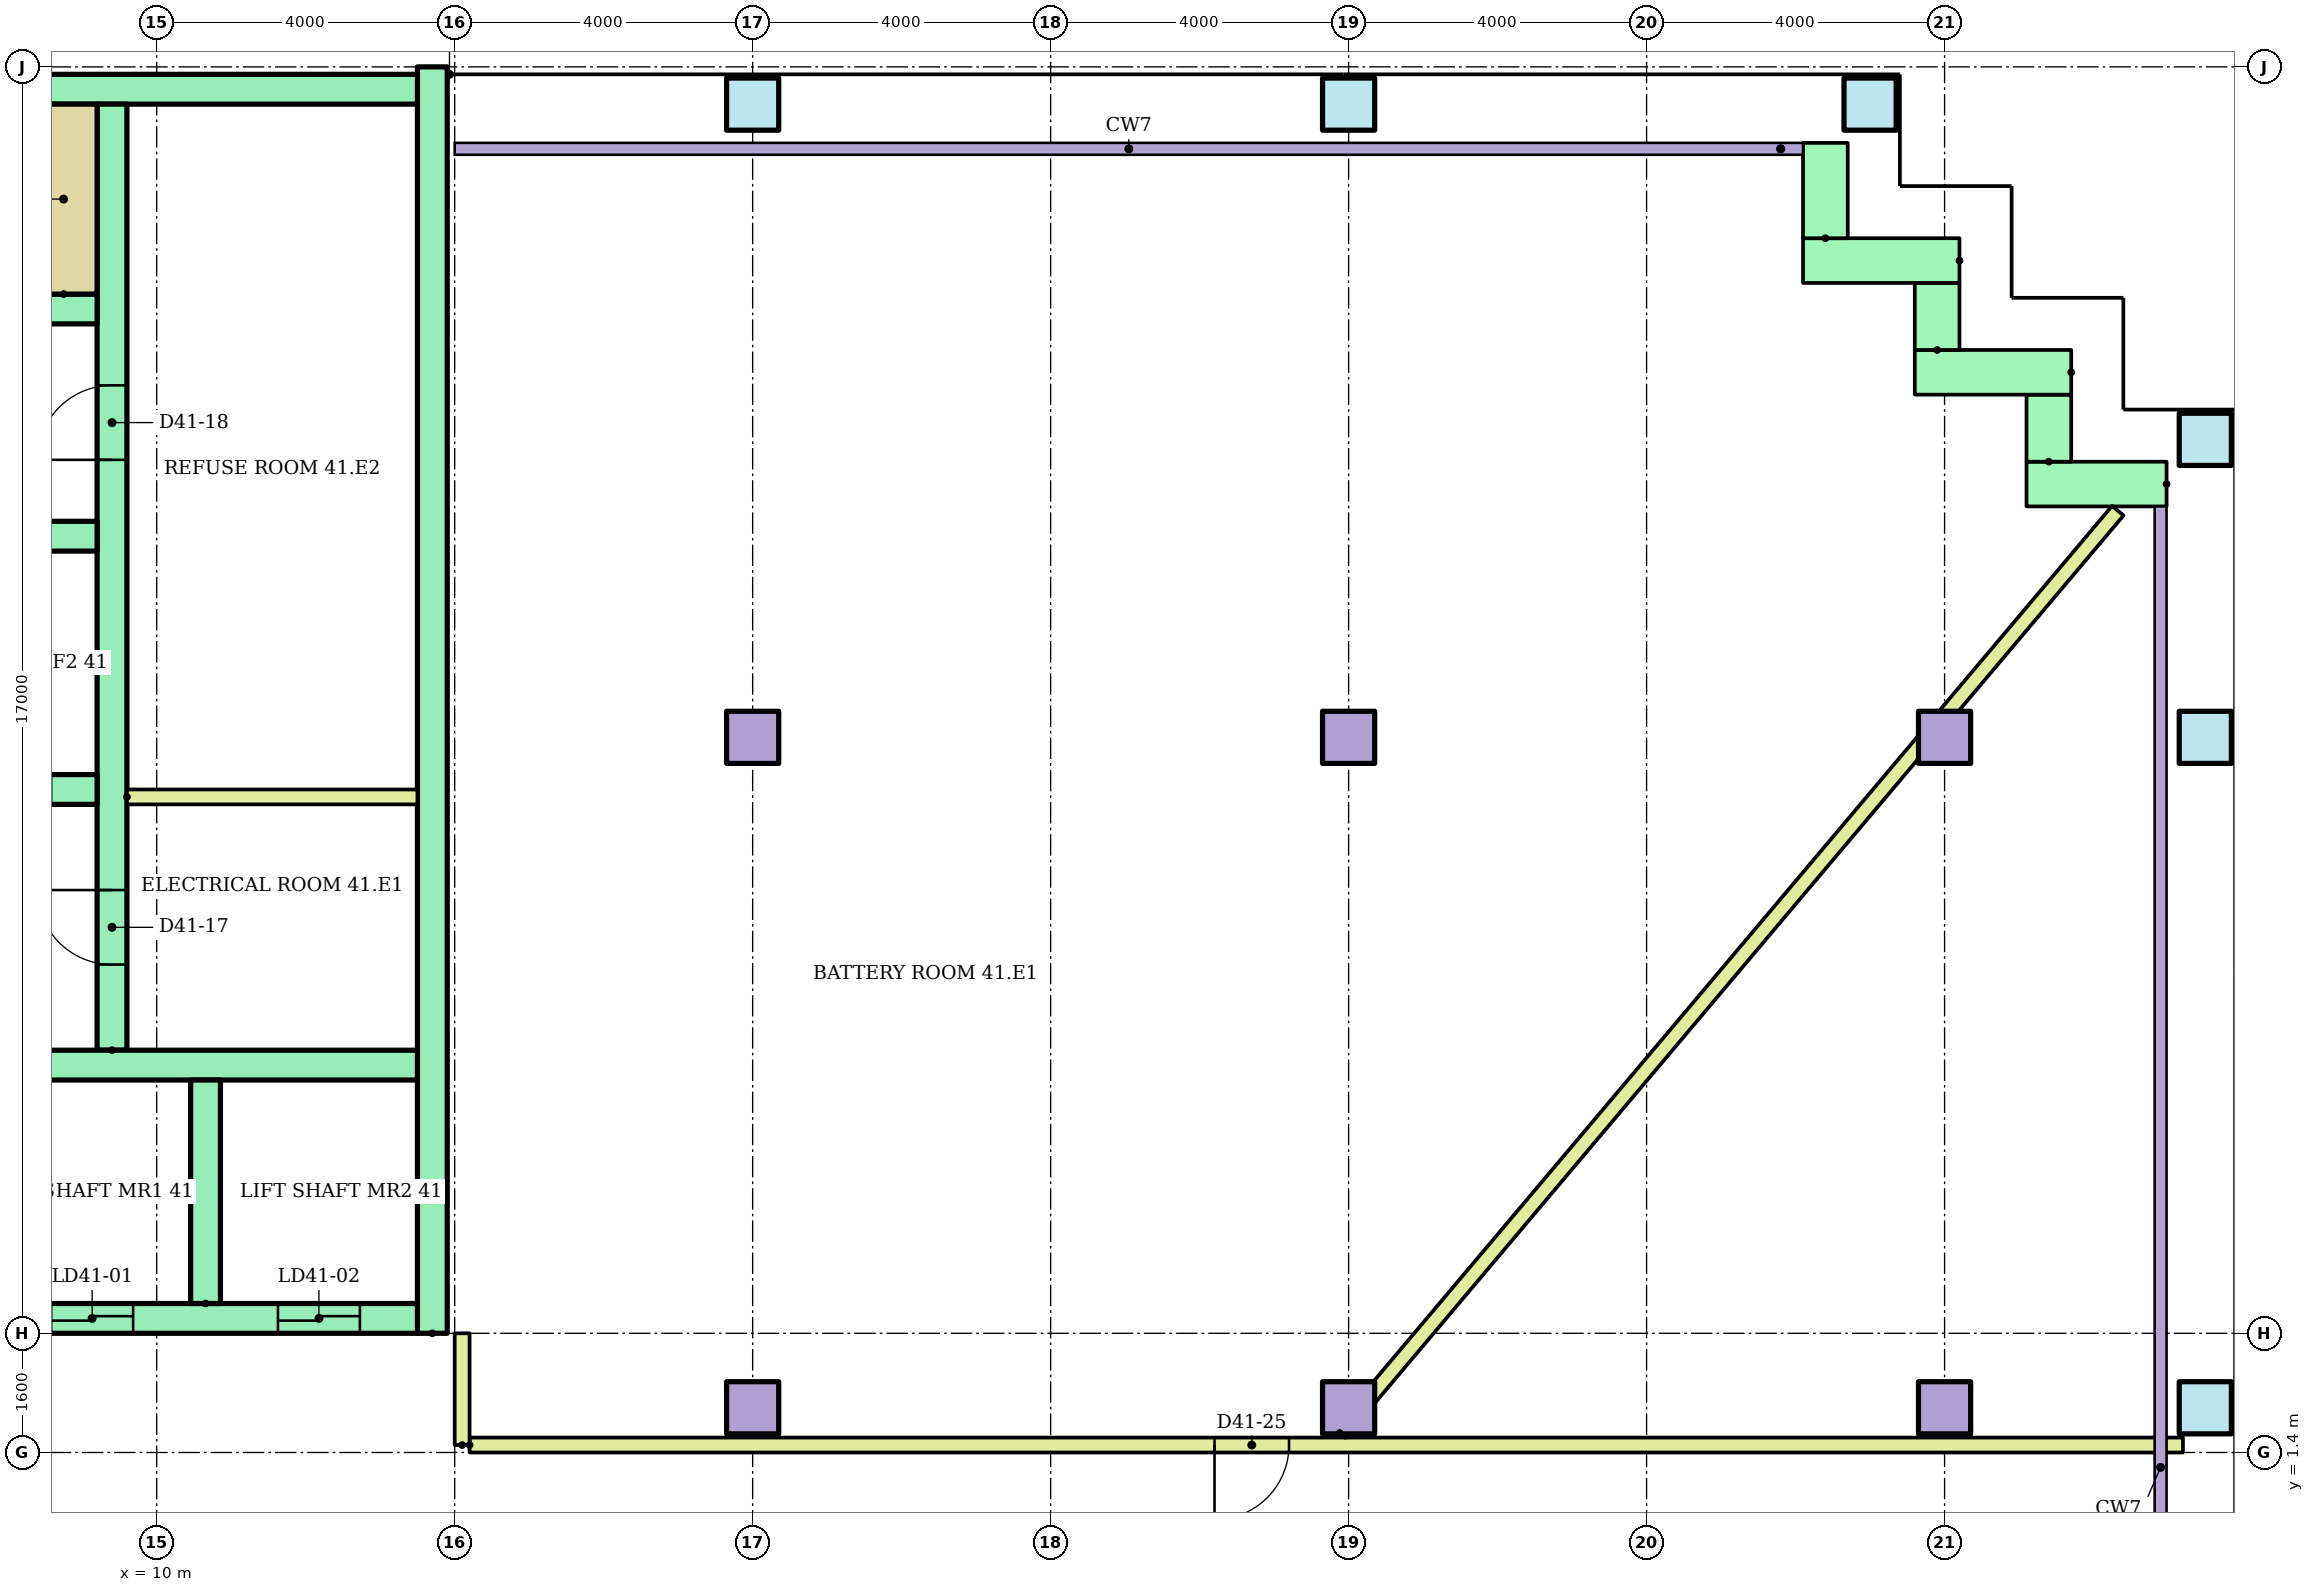
"""IFC4 building model, lengths in metres.
Left out: names, types, materials, properties, quantities, classifications, styles, units other than length and angle.
Written with IfcOpenShell. Run it as: python <this file> out.ifc"""

import sys

from ifc_helpers import new_model, si_unit, direction, frame, frame_2d, origin, origin_2d, place, context, subcontext, project, spatial, rectangle, hollow_rectangle, extrude, element, fill, save


model = new_model("IFC4")
c1 = context("Model", 3, precision=1e-05, world=origin(), true_north=direction((0.0, 1.0)))
c2 = subcontext(c1, "Body", "Model", "MODEL_VIEW")
j1 = project(units=[si_unit("LENGTHUNIT", "METRE"), si_unit("PLANEANGLEUNIT", "RADIAN")], contexts=[c1])
p1 = place(None, origin())
s1 = spatial("IfcSite", under=j1, at=p1, CompositionType="ELEMENT")
p2 = place(p1, origin())
s2 = spatial("IfcBuilding", under=s1, at=p2, CompositionType="ELEMENT")
p3 = place(p2, frame((0.0, 0.0, 161.4)))
s3 = spatial("IfcBuildingStorey", under=s2, at=p3, CompositionType="ELEMENT", Elevation=161.4)
for number, where in (
    (1, (18.0, 2.0, 0.0)),
    (2, (26.0, 2.0, 0.0)),
    (3, (34.0, 2.0, 0.0)),
):
    element("IfcColumn", number, at=place(p3, frame(where)), inside=s3, PredefinedType="COLUMN", context=c2, shape_type="SweptSolid", body=[
        extrude(rectangle(XDim=0.7, YDim=0.7, at=origin_2d()), origin(), (0.0, 0.0, 1.0), 3.9),
    ])
p4 = place(p3, frame((37.5, 2.0, 0.0)))
e4 = element("IfcColumn", 4, at=p4, inside=s3, PredefinedType="COLUMN", context=c2, shape_type="SweptSolid", body=[
    extrude(hollow_rectangle(XDim=0.7, YDim=0.7, WallThickness=0.036, at=origin_2d()), origin(), (0.0, 0.0, 1.0), 3.9),
])
for number, where in (
    (5, (18.0, 11.0, 0.0)),
    (6, (26.0, 11.0, 0.0)),
    (7, (34.0, 11.0, 0.0)),
):
    element("IfcColumn", number, at=place(p3, frame(where)), inside=s3, PredefinedType="COLUMN", context=c2, shape_type="SweptSolid", body=[
        extrude(rectangle(XDim=0.7, YDim=0.7, at=origin_2d()), origin(), (0.0, 0.0, 1.0), 3.9),
    ])
for number, where in (
    (8, (37.5, 11.0, 0.0)),
    (9, (37.5, 15.0, 0.0)),
    (10, (18.0, 19.5, 0.0)),
    (11, (26.0, 19.5, 0.0)),
    (12, (33.0, 19.5, 0.0)),
):
    element("IfcColumn", number, at=place(p3, frame(where)), inside=s3, PredefinedType="COLUMN", context=c2, shape_type="SweptSolid", body=[
        extrude(hollow_rectangle(XDim=0.7, YDim=0.7, WallThickness=0.036, at=origin_2d()), origin(), (0.0, 0.0, 1.0), 3.9),
    ])
p5 = place(p3, frame((36.98, 14.4, 0.0), z_axis=(0.0, 0.0, 1.0), x_axis=(-1.0, 0.0, 0.0)))
e13 = element("IfcWall", 13, at=p5, inside=s3, PredefinedType="STANDARD", context=c2, shape_type="SweptSolid", body=[
    extrude(rectangle(XDim=1.88, YDim=0.6, at=frame_2d((0.94, 0.0))), origin(), (0.0, 0.0, 1.0), 3.62),
])
p6 = place(p3, frame((35.4, 14.7, 0.0), z_axis=(0.0, 0.0, 1.0), x_axis=(0.0, 1.0, 0.0)))
e14 = element("IfcWall", 14, at=p6, inside=s3, PredefinedType="STANDARD", context=c2, shape_type="SweptSolid", body=[
    extrude(rectangle(XDim=0.9, YDim=0.6, at=frame_2d((0.45, 0.0))), origin(), (0.0, 0.0, 1.0), 3.62),
])
p7 = place(p3, frame((35.7, 15.9, 0.0), z_axis=(0.0, 0.0, 1.0), x_axis=(-1.0, 0.0, 0.0)))
e15 = element("IfcWall", 15, at=p7, inside=s3, PredefinedType="STANDARD", context=c2, shape_type="SweptSolid", body=[
    extrude(rectangle(XDim=2.1, YDim=0.6, at=frame_2d((1.05, 0.0))), origin(), (0.0, 0.0, 1.0), 3.62),
])
p8 = place(p3, frame((33.9, 16.2, 0.0), z_axis=(0.0, 0.0, 1.0), x_axis=(0.0, 1.0, 0.0)))
e16 = element("IfcWall", 16, at=p8, inside=s3, PredefinedType="STANDARD", context=c2, shape_type="SweptSolid", body=[
    extrude(rectangle(XDim=0.9, YDim=0.6, at=frame_2d((0.45, 0.0))), origin(), (0.0, 0.0, 1.0), 3.62),
])
p9 = place(p3, frame((34.2, 17.4, 0.0), z_axis=(0.0, 0.0, 1.0), x_axis=(-1.0, 0.0, 0.0)))
e17 = element("IfcWall", 17, at=p9, inside=s3, PredefinedType="STANDARD", context=c2, shape_type="SweptSolid", body=[
    extrude(rectangle(XDim=2.1, YDim=0.6, at=frame_2d((1.05, 0.0))), origin(), (0.0, 0.0, 1.0), 3.62),
])
p10 = place(p3, frame((32.4, 17.7, 0.0), z_axis=(0.0, 0.0, 1.0), x_axis=(0.0, 1.0, 0.0)))
e18 = element("IfcWall", 18, at=p10, inside=s3, PredefinedType="STANDARD", context=c2, shape_type="SweptSolid", body=[
    extrude(rectangle(XDim=1.28, YDim=0.6, at=frame_2d((0.64, 0.0))), origin(), (0.0, 0.0, 1.0), 3.62),
])
p11 = place(p3, frame((13.7, 3.0, 0.0), z_axis=(0.0, 0.0, 1.0), x_axis=(0.0, 1.0, 0.0)))
e19 = element("IfcWall", 19, at=p11, inside=s3, PredefinedType="SHEAR", context=c2, shape_type="SweptSolid", body=[
    extrude(rectangle(XDim=17.0, YDim=0.4, at=frame_2d((8.5, 0.0))), origin(), (0.0, 0.0, 1.0), 3.62),
])
p12 = place(p3, frame((-13.5, 19.7, 0.0)))
e20 = element("IfcWall", 20, at=p12, inside=s3, PredefinedType="SHEAR", context=c2, shape_type="SweptSolid", body=[
    extrude(rectangle(XDim=27.0, YDim=0.4, at=frame_2d((13.5, 0.0))), origin(), (0.0, 0.0, 1.0), 3.62),
])
p13 = place(p3, frame((9.4, 6.8, 0.0), z_axis=(0.0, 0.0, 1.0), x_axis=(0.0, 1.0, 0.0)))
e21 = element("IfcWall", 21, at=p13, inside=s3, PredefinedType="SHEAR", context=c2, shape_type="SweptSolid", body=[
    extrude(rectangle(XDim=12.7, YDim=0.4, at=frame_2d((6.35, 0.0))), origin(), (0.0, 0.0, 1.0), 3.62),
])
p14 = place(p13, frame((1.15, 0.0, 0.0)))
e22 = element("IfcOpeningElement", 22, at=p14, cuts=e21, PredefinedType="OPENING", context=c2, shape_type="SweptSolid", body=[
    extrude(rectangle(XDim=1.0, YDim=2.1, at=frame_2d((0.5, 1.05))), frame((0.0, 0.21, 0.0), z_axis=(0.0, -1.0, 0.0), x_axis=(1.0, 0.0, 0.0)), (0.0, 0.0, 1.0), 0.42),
])
p15 = place(p13, frame((7.925, 0.0, 0.0)))
e23 = element("IfcOpeningElement", 23, at=p15, cuts=e21, PredefinedType="OPENING", context=c2, shape_type="SweptSolid", body=[
    extrude(rectangle(XDim=1.0, YDim=2.1, at=frame_2d((0.5, 1.05))), frame((0.0, 0.21, 0.0), z_axis=(0.0, -1.0, 0.0), x_axis=(1.0, 0.0, 0.0)), (0.0, 0.0, 1.0), 0.42),
])
p16 = place(p3, frame((-13.5, 3.2, 0.0)))
e24 = element("IfcWall", 24, at=p16, inside=s3, PredefinedType="SHEAR", context=c2, shape_type="SweptSolid", body=[
    extrude(rectangle(XDim=27.0, YDim=0.4, at=frame_2d((13.5, 0.0))), origin(), (0.0, 0.0, 1.0), 3.62),
])
p17 = place(p16, frame((22.083, 0.0, 0.0)))
e25 = element("IfcOpeningElement", 25, at=p17, cuts=e24, PredefinedType="OPENING", context=c2, shape_type="SweptSolid", body=[
    extrude(rectangle(XDim=1.1, YDim=2.1, at=frame_2d((0.55, 1.05))), frame((0.0, 0.21, 0.0), z_axis=(0.0, -1.0, 0.0), x_axis=(1.0, 0.0, 0.0)), (0.0, 0.0, 1.0), 0.42),
])
p18 = place(p16, frame((25.128, 0.0, 0.0)))
e26 = element("IfcOpeningElement", 26, at=p18, cuts=e24, PredefinedType="OPENING", context=c2, shape_type="SweptSolid", body=[
    extrude(rectangle(XDim=1.1, YDim=2.1, at=frame_2d((0.55, 1.05))), frame((0.0, 0.21, 0.0), z_axis=(0.0, -1.0, 0.0), x_axis=(1.0, 0.0, 0.0)), (0.0, 0.0, 1.0), 0.42),
])
p19 = place(p16, frame((12.6, 0.0, 0.0)))
e27 = element("IfcOpeningElement", 27, at=p19, cuts=e24, PredefinedType="OPENING", context=c2, shape_type="SweptSolid", body=[
    extrude(rectangle(XDim=1.8, YDim=2.1, at=frame_2d((0.9, 1.05))), frame((0.0, 0.21, 0.0), z_axis=(0.0, -1.0, 0.0), x_axis=(1.0, 0.0, 0.0)), (0.0, 0.0, 1.0), 0.42),
])
p20 = place(p3, frame((1.522, 6.6, 0.0)))
e28 = element("IfcWall", 28, at=p20, inside=s3, PredefinedType="SHEAR", context=c2, shape_type="SweptSolid", body=[
    extrude(rectangle(XDim=11.978, YDim=0.4, at=frame_2d((5.989, 0.0))), origin(), (0.0, 0.0, 1.0), 3.62),
])
p21 = place(p20, frame((1.022, 0.0, 0.0)))
e29 = element("IfcOpeningElement", 29, at=p21, cuts=e28, PredefinedType="OPENING", context=c2, shape_type="SweptSolid", body=[
    extrude(rectangle(XDim=1.0, YDim=2.1, at=frame_2d((0.5, 1.05))), frame((0.0, 0.21, 0.0), z_axis=(0.0, -1.0, 0.0), x_axis=(1.0, 0.0, 0.0)), (0.0, 0.0, 1.0), 0.42),
])
p22 = place(p20, frame((4.067, 0.0, 0.0)))
e30 = element("IfcOpeningElement", 30, at=p22, cuts=e28, PredefinedType="OPENING", context=c2, shape_type="SweptSolid", body=[
    extrude(rectangle(XDim=1.0, YDim=2.1, at=frame_2d((0.5, 1.05))), frame((0.0, 0.21, 0.0), z_axis=(0.0, -1.0, 0.0), x_axis=(1.0, 0.0, 0.0)), (0.0, 0.0, 1.0), 0.42),
])
p23 = place(p3, frame((10.656, 3.4, 0.0), z_axis=(0.0, 0.0, 1.0), x_axis=(0.0, 1.0, 0.0)))
e31 = element("IfcWall", 31, at=p23, inside=s3, PredefinedType="SHEAR", context=c2, shape_type="SweptSolid", body=[
    extrude(rectangle(XDim=3.0, YDim=0.4, at=frame_2d((1.5, 0.0))), origin(), (0.0, 0.0, 1.0), 3.62),
])
p24 = place(p3, frame((1.2, 10.3, 0.0)))
e32 = element("IfcWall", 32, at=p24, inside=s3, PredefinedType="SHEAR", context=c2, shape_type="SweptSolid", body=[
    extrude(rectangle(XDim=8.0, YDim=0.4, at=frame_2d((4.0, 0.0))), origin(), (0.0, 0.0, 1.0), 3.62),
])
p25 = place(p24, frame((3.55, 0.0, 0.0)))
e33 = element("IfcOpeningElement", 33, at=p25, cuts=e32, PredefinedType="OPENING", context=c2, shape_type="SweptSolid", body=[
    extrude(rectangle(XDim=1.1, YDim=2.1, at=frame_2d((0.55, 1.05))), frame((0.0, 0.21, 0.0), z_axis=(0.0, -1.0, 0.0), x_axis=(1.0, 0.0, 0.0)), (0.0, 0.0, 1.0), 0.42),
])
p26 = place(p24, frame((6.283, 0.0, 0.0)))
e34 = element("IfcOpeningElement", 34, at=p26, cuts=e32, PredefinedType="OPENING", context=c2, shape_type="SweptSolid", body=[
    extrude(rectangle(XDim=1.1, YDim=2.1, at=frame_2d((0.55, 1.05))), frame((0.0, 0.21, 0.0), z_axis=(0.0, -1.0, 0.0), x_axis=(1.0, 0.0, 0.0)), (0.0, 0.0, 1.0), 0.42),
])
p27 = place(p24, frame((0.867, 0.0, 0.0)))
e35 = element("IfcOpeningElement", 35, at=p27, cuts=e32, PredefinedType="OPENING", context=c2, shape_type="SweptSolid", body=[
    extrude(rectangle(XDim=1.0, YDim=2.1, at=frame_2d((0.5, 1.05))), frame((0.0, 0.21, 0.0), z_axis=(0.0, -1.0, 0.0), x_axis=(1.0, 0.0, 0.0)), (0.0, 0.0, 1.0), 0.42),
])
p28 = place(p3, frame((1.2, 13.7, 0.0)))
e36 = element("IfcWall", 36, at=p28, inside=s3, PredefinedType="SHEAR", context=c2, shape_type="SweptSolid", body=[
    extrude(rectangle(XDim=8.0, YDim=0.4, at=frame_2d((4.0, 0.0))), origin(), (0.0, 0.0, 1.0), 3.62),
])
p29 = place(p3, frame((-9.2, 16.75, 0.0)))
e37 = element("IfcWall", 37, at=p29, inside=s3, PredefinedType="SHEAR", context=c2, shape_type="SweptSolid", body=[
    extrude(rectangle(XDim=18.4, YDim=0.4, at=frame_2d((9.2, 0.0))), origin(), (0.0, 0.0, 1.0), 3.62),
])
p30 = place(p29, frame((0.1, 0.0, 0.0)))
e38 = element("IfcOpeningElement", 38, at=p30, cuts=e37, PredefinedType="OPENING", context=c2, shape_type="SweptSolid", body=[
    extrude(rectangle(XDim=0.95, YDim=2.1, at=frame_2d((0.475, 1.05))), frame((0.0, 0.21, 0.0), z_axis=(0.0, -1.0, 0.0), x_axis=(1.0, 0.0, 0.0)), (0.0, 0.0, 1.0), 0.42),
])
p31 = place(p29, frame((6.1, 0.0, 0.0)))
e39 = element("IfcOpeningElement", 39, at=p31, cuts=e37, PredefinedType="OPENING", context=c2, shape_type="SweptSolid", body=[
    extrude(rectangle(XDim=0.95, YDim=2.1, at=frame_2d((0.475, 1.05))), frame((0.0, 0.21, 0.0), z_axis=(0.0, -1.0, 0.0), x_axis=(1.0, 0.0, 0.0)), (0.0, 0.0, 1.0), 0.42),
])
p32 = place(p29, frame((12.1, 0.0, 0.0)))
e40 = element("IfcOpeningElement", 40, at=p32, cuts=e37, PredefinedType="OPENING", context=c2, shape_type="SweptSolid", body=[
    extrude(rectangle(XDim=0.95, YDim=2.1, at=frame_2d((0.475, 1.05))), frame((0.0, 0.21, 0.0), z_axis=(0.0, -1.0, 0.0), x_axis=(1.0, 0.0, 0.0)), (0.0, 0.0, 1.0), 0.42),
])
p33 = place(p3, frame((8.75, 16.95, 0.0), z_axis=(0.0, 0.0, 1.0), x_axis=(0.0, 1.0, 0.0)))
e41 = element("IfcWall", 41, at=p33, inside=s3, PredefinedType="SHEAR", context=c2, shape_type="SweptSolid", body=[
    extrude(rectangle(XDim=2.55, YDim=0.9, at=frame_2d((1.275, 0.0))), origin(), (0.0, 0.0, 1.0), 3.62),
])
p34 = place(p3, frame((9.6, 10.2, 0.0)))
e42 = element("IfcWall", 42, at=p34, inside=s3, PredefinedType="PARTITIONING", context=c2, shape_type="SweptSolid", body=[
    extrude(rectangle(XDim=3.9, YDim=0.2, at=frame_2d((1.95, 0.0))), origin(), (0.0, 0.0, 1.0), 3.62),
])
p35 = place(p3, frame((14.2, 1.5, 0.0)))
e43 = element("IfcWall", 43, at=p35, inside=s3, PredefinedType="PARTITIONING", context=c2, shape_type="SweptSolid", body=[
    extrude(rectangle(XDim=23.0, YDim=0.2, at=frame_2d((11.5, 0.0))), origin(), (0.0, 0.0, 1.0), 3.62),
])
p36 = place(p35, frame((10.0, 0.0, 0.0)))
e44 = element("IfcOpeningElement", 44, at=p36, cuts=e43, PredefinedType="OPENING", context=c2, shape_type="SweptSolid", body=[
    extrude(rectangle(XDim=1.0, YDim=2.4, at=frame_2d((0.5, 1.2))), frame((0.0, 0.11, 0.0), z_axis=(0.0, -1.0, 0.0), x_axis=(1.0, 0.0, 0.0)), (0.0, 0.0, 1.0), 0.22),
])
p37 = place(p3, frame((14.1, 1.5, 0.0), z_axis=(0.0, 0.0, 1.0), x_axis=(0.0, 1.0, 0.0)))
e45 = element("IfcWall", 45, at=p37, inside=s3, PredefinedType="PARTITIONING", context=c2, shape_type="SweptSolid", body=[
    extrude(rectangle(XDim=1.5, YDim=0.2, at=frame_2d((0.75, 0.0))), origin(), (0.0, 0.0, 1.0), 3.62),
])
p38 = place(p3, frame((25.882, 1.661, 0.0), z_axis=(0.0, 0.0, 1.0), x_axis=(0.644765830632, 0.764380156499, 0.0)))
e46 = element("IfcWall", 46, at=p38, inside=s3, PredefinedType="PARTITIONING", context=c2, shape_type="SweptSolid", body=[
    extrude(rectangle(XDim=16.198, YDim=0.2, at=frame_2d((8.099, 0.0))), origin(), (0.0, 0.0, 1.0), 3.62),
])
p39 = place(p17, origin())
e47 = element("IfcDoor", 47, at=p39, inside=s3, OperationType="SLIDING_TO_LEFT", PredefinedType="DOOR", context=c2, shape_type="SweptSolid", body=[
    extrude(rectangle(XDim=1.1, YDim=2.1, at=frame_2d((0.55, 1.05))), frame((0.0, 0.025, 0.0), z_axis=(0.0, -1.0, 0.0), x_axis=(1.0, 0.0, 0.0)), (0.0, 0.0, 1.0), 0.05),
])
fill(e25, e47)
p40 = place(p18, origin())
e48 = element("IfcDoor", 48, at=p40, inside=s3, OperationType="SLIDING_TO_LEFT", PredefinedType="DOOR", context=c2, shape_type="SweptSolid", body=[
    extrude(rectangle(XDim=1.1, YDim=2.1, at=frame_2d((0.55, 1.05))), frame((0.0, 0.025, 0.0), z_axis=(0.0, -1.0, 0.0), x_axis=(1.0, 0.0, 0.0)), (0.0, 0.0, 1.0), 0.05),
])
fill(e26, e48)
p41 = place(p14, origin())
e49 = element("IfcDoor", 49, at=p41, inside=s3, OperationType="SINGLE_SWING_RIGHT", PredefinedType="DOOR", context=c2, shape_type="SweptSolid", body=[
    extrude(rectangle(XDim=1.0, YDim=2.1, at=frame_2d((0.5, 1.05))), frame((0.0, 0.025, 0.0), z_axis=(0.0, -1.0, 0.0), x_axis=(1.0, 0.0, 0.0)), (0.0, 0.0, 1.0), 0.05),
])
fill(e22, e49)
p42 = place(p15, origin())
e50 = element("IfcDoor", 50, at=p42, inside=s3, OperationType="SINGLE_SWING_LEFT", PredefinedType="DOOR", context=c2, shape_type="SweptSolid", body=[
    extrude(rectangle(XDim=1.0, YDim=2.1, at=frame_2d((0.5, 1.05))), frame((0.0, 0.025, 0.0), z_axis=(0.0, -1.0, 0.0), x_axis=(1.0, 0.0, 0.0)), (0.0, 0.0, 1.0), 0.05),
])
fill(e23, e50)
p43 = place(p36, frame((1.0, 0.0, 0.0), z_axis=(0.0, 0.0, 1.0), x_axis=(-1.0, 0.0, 0.0)))
e51 = element("IfcDoor", 51, at=p43, inside=s3, OperationType="SINGLE_SWING_LEFT", PredefinedType="DOOR", context=c2, shape_type="SweptSolid", body=[
    extrude(rectangle(XDim=1.0, YDim=2.4, at=frame_2d((0.5, 1.2))), frame((0.0, 0.025, 0.0), z_axis=(0.0, -1.0, 0.0), x_axis=(1.0, 0.0, 0.0)), (0.0, 0.0, 1.0), 0.05),
])
fill(e44, e51)
save(model, sys.argv[1])
